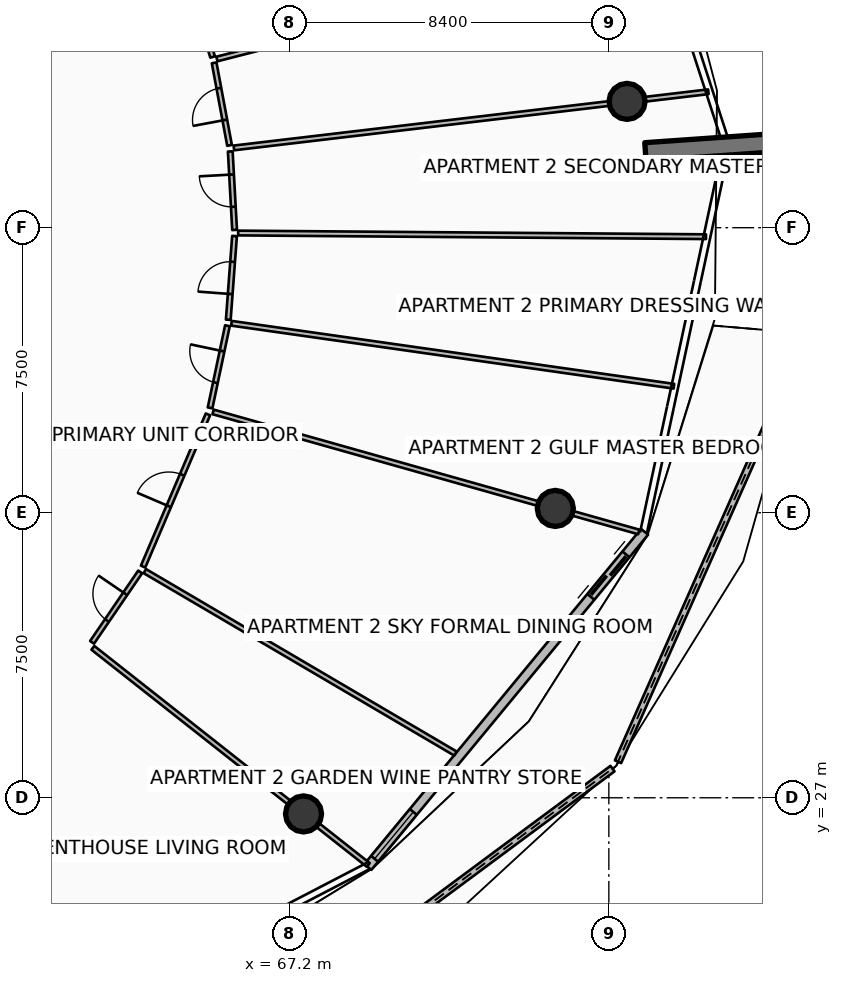
"""IFC4 building model, lengths in metres.
Left out: names, types, materials, properties, quantities, classifications, styles, units other than length and angle.
Written with IfcOpenShell. Run it as: python <this file> out.ifc"""

import sys

from ifc_helpers import new_model, si_unit, direction, frame, frame_2d, origin, origin_2d, place, context, subcontext, project, spatial, polyline, rectangle, circle, outline, extrude, element, fill, save


model = new_model("IFC4")
c1 = context("Model", 3, precision=1e-05, world=origin(), true_north=direction((0.0, 1.0)))
c2 = subcontext(c1, "Body", "Model", "MODEL_VIEW")
j1 = project(units=[si_unit("LENGTHUNIT", "METRE"), si_unit("PLANEANGLEUNIT", "RADIAN")], contexts=[c1])
p1 = place(None, origin())
s1 = spatial("IfcSite", under=j1, at=p1, CompositionType="ELEMENT")
p2 = place(p1, origin())
s2 = spatial("IfcBuilding", under=s1, at=p2, CompositionType="ELEMENT")
p3 = place(p2, frame((0.0, 0.0, 248.25)))
s3 = spatial("IfcBuildingStorey", under=s2, at=p3, CompositionType="ELEMENT", Elevation=248.25)
p4 = place(p3, frame((76.562, 43.997, 0.0), z_axis=(0.0, 0.0, 1.0), x_axis=(0.997563824095, 0.069759707979, 0.0)))
e1 = element("IfcWall", 1, at=p4, inside=s3, PredefinedType="SOLIDWALL", context=c2, shape_type="SweptSolid", body=[
    extrude(rectangle(XDim=3.5, YDim=0.48, at=frame_2d((1.75, 0.0))), origin(), (0.0, 0.0, 1.0), 3.85),
])
for number, where, z_axis, x_axis in (
    (2, (67.566, 26.575, 0.0), (0.0, 0.0, 1.0), (1.0, 0.0, 0.0)),
    (3, (74.191, 34.613, 0.0), (0.0, 0.0, 1.0), (1.0, 0.0, 0.0)),
    (4, (76.08, 45.323, 0.0), (0.0, 0.0, 1.0), (1.0, 0.0, 0.0)),
):
    element("IfcColumn", number, at=place(p3, frame(where, z_axis=z_axis, x_axis=x_axis)), inside=s3, PredefinedType="COLUMN", context=c2, shape_type="SweptSolid", body=[
        extrude(circle(Radius=0.475, at=origin_2d()), origin(), (0.0, 0.0, 1.0), 3.59),
    ])
p5 = place(p3, frame((66.319, 20.815, 0.0), z_axis=(0.0, 0.0, 1.0), x_axis=(0.803330402034, 0.59553359701, 0.0)))
e5 = element("IfcWall", 5, at=p5, inside=s3, PredefinedType="PARAPET", context=c2, shape_type="SweptSolid", body=[
    extrude(outline(polyline([(0.0, 0.0), (11.674, 0.0), (11.674, 1.832), (5.837, 1.696), (0.0, 1.497), (0.0, 0.0)])), frame((0.0, 0.09, 0.0), z_axis=(0.0, -1.0, 0.0), x_axis=(1.0, 0.0, 0.0)), (0.0, 0.0, 1.0), 0.18),
])
p6 = place(p3, frame((75.842, 27.948, 0.0), z_axis=(0.0, 0.0, 1.0), x_axis=(0.405327660322, 0.914171476135, 0.0)))
e6 = element("IfcWall", 6, at=p6, inside=s3, PredefinedType="PARAPET", context=c2, shape_type="SweptSolid", body=[
    extrude(outline(polyline([(0.0, 0.0), (12.323, 0.0), (12.323, 1.756), (6.162, 1.853), (0.0, 1.832), (0.0, 0.0)])), frame((0.0, 0.09, 0.0), z_axis=(0.0, -1.0, 0.0), x_axis=(1.0, 0.0, 0.0)), (0.0, 0.0, 1.0), 0.18),
])
p7 = place(p3, frame((69.258, 25.178, 0.0), z_axis=(0.0, 0.0, 1.0), x_axis=(0.636680093065, 0.771128043255, 0.0)))
e7 = element("IfcWall", 7, at=p7, inside=s3, PredefinedType="SOLIDWALL", context=c2, shape_type="SweptSolid", body=[
    extrude(rectangle(XDim=11.438, YDim=0.24, at=frame_2d((5.719, 0.0))), origin(), (0.0, 0.0, 1.0), 2.54),
])
p8 = place(p7, frame((9.218, 0.0, 0.0)))
e8 = element("IfcOpeningElement", 8, at=p8, cuts=e7, PredefinedType="OPENING", context=c2, shape_type="SweptSolid", body=[
    extrude(rectangle(XDim=1.45, YDim=2.15, at=frame_2d((0.725, 1.075))), frame((0.0, 0.13, 0.0), z_axis=(0.0, -1.0, 0.0), x_axis=(1.0, 0.0, 0.0)), (0.0, 0.0, 1.0), 0.26),
])
p9 = place(p7, frame((0.28, 0.0, 0.65)))
e9 = element("IfcOpeningElement", 9, at=p9, cuts=e7, PredefinedType="OPENING", context=c2, shape_type="SweptSolid", body=[
    extrude(rectangle(XDim=1.6, YDim=1.5, at=frame_2d((0.8, 0.75))), frame((0.0, 0.13, 0.0), z_axis=(0.0, -1.0, 0.0), x_axis=(1.0, 0.0, 0.0)), (0.0, 0.0, 1.0), 0.26),
])
p10 = place(p3, frame((62.023, 30.945, 0.0), z_axis=(0.0, 0.0, 1.0), x_axis=(0.785322102606, -0.619087388952, 0.0)))
e10 = element("IfcWall", 10, at=p10, inside=s3, PredefinedType="PARTITIONING", context=c2, shape_type="SweptSolid", body=[
    extrude(rectangle(XDim=9.228, YDim=0.125, at=frame_2d((4.614, 0.0))), origin(), (0.0, 0.0, 1.0), 2.957),
])
p11 = place(p3, frame((63.39, 32.963, 0.0), z_axis=(0.0, 0.0, 1.0), x_axis=(0.862331921897, -0.506343417532, 0.0)))
e11 = element("IfcWall", 11, at=p11, inside=s3, PredefinedType="PARTITIONING", context=c2, shape_type="SweptSolid", body=[
    extrude(rectangle(XDim=9.478, YDim=0.125, at=frame_2d((4.739, 0.0))), origin(), (0.0, 0.0, 1.0), 3.03),
])
p12 = place(p3, frame((62.001, 31.089, 0.0), z_axis=(0.0, 0.0, 1.0), x_axis=(0.564052095913, 0.825739204044, 0.0)))
e12 = element("IfcWall", 12, at=p12, inside=s3, PredefinedType="PARTITIONING", context=c2, shape_type="SweptSolid", body=[
    extrude(rectangle(XDim=2.245, YDim=0.125, at=frame_2d((1.122, 0.0))), origin(), (0.0, 0.0, 1.0), 2.957),
])
p13 = place(p12, frame((0.698, 0.0, 0.0)))
e13 = element("IfcOpeningElement", 13, at=p13, cuts=e12, PredefinedType="OPENING", context=c2, shape_type="SweptSolid", body=[
    extrude(rectangle(XDim=0.85, YDim=2.06, at=frame_2d((0.425, 1.03))), frame((0.0, 0.073, 0.0), z_axis=(0.0, -1.0, 0.0), x_axis=(1.0, 0.0, 0.0)), (0.0, 0.0, 1.0), 0.145),
])
p14 = place(p3, frame((63.344, 33.083, 0.0), z_axis=(0.0, 0.0, 1.0), x_axis=(0.392064212371, 0.919937852998, 0.0)))
e14 = element("IfcWall", 14, at=p14, inside=s3, PredefinedType="PARTITIONING", context=c2, shape_type="SweptSolid", body=[
    extrude(rectangle(XDim=4.354, YDim=0.125, at=frame_2d((2.177, 0.0))), origin(), (0.0, 0.0, 1.0), 2.957),
])
p15 = place(p14, frame((1.727, 0.0, 0.0)))
e15 = element("IfcOpeningElement", 15, at=p15, cuts=e14, PredefinedType="OPENING", context=c2, shape_type="SweptSolid", body=[
    extrude(rectangle(XDim=0.9, YDim=2.08, at=frame_2d((0.45, 1.04))), frame((0.0, 0.073, 0.0), z_axis=(0.0, -1.0, 0.0), x_axis=(1.0, 0.0, 0.0)), (0.0, 0.0, 1.0), 0.145),
])
p16 = place(p3, frame((65.187, 37.153, 0.0), z_axis=(0.0, 0.0, 1.0), x_axis=(0.962455577867, -0.271439239301, 0.0)))
e16 = element("IfcWall", 16, at=p16, inside=s3, PredefinedType="PARTITIONING", context=c2, shape_type="SweptSolid", body=[
    extrude(rectangle(XDim=11.639, YDim=0.125, at=frame_2d((5.819, 0.0))), origin(), (0.0, 0.0, 1.0), 2.957),
])
p17 = place(p3, frame((65.669, 39.485, 0.0), z_axis=(0.0, 0.0, 1.0), x_axis=(0.990022432034, -0.140909843761, 0.0)))
e17 = element("IfcWall", 17, at=p17, inside=s3, PredefinedType="PARTITIONING", context=c2, shape_type="SweptSolid", body=[
    extrude(rectangle(XDim=11.761, YDim=0.125, at=frame_2d((5.88, 0.0))), origin(), (0.0, 0.0, 1.0), 3.03),
])
p18 = place(p3, frame((65.846, 41.86, 0.0), z_axis=(0.0, 0.0, 1.0), x_axis=(0.999969162233, -0.007853316706, 0.0)))
e18 = element("IfcWall", 18, at=p18, inside=s3, PredefinedType="PARTITIONING", context=c2, shape_type="SweptSolid", body=[
    extrude(rectangle(XDim=12.311, YDim=0.125, at=frame_2d((6.155, 0.0))), origin(), (0.0, 0.0, 1.0), 3.03),
])
p19 = place(p3, frame((65.107, 37.258, 0.0), z_axis=(0.0, 0.0, 1.0), x_axis=(0.20677346991, 0.978388845062, 0.0)))
e19 = element("IfcWall", 19, at=p19, inside=s3, PredefinedType="PARTITIONING", context=c2, shape_type="SweptSolid", body=[
    extrude(rectangle(XDim=2.209, YDim=0.125, at=frame_2d((1.104, 0.0))), origin(), (0.0, 0.0, 1.0), 2.957),
])
p20 = place(p19, frame((0.68, 0.0, 0.0)))
e20 = element("IfcOpeningElement", 20, at=p20, cuts=e19, PredefinedType="OPENING", context=c2, shape_type="SweptSolid", body=[
    extrude(rectangle(XDim=0.85, YDim=2.06, at=frame_2d((0.425, 1.03))), frame((0.0, 0.073, 0.0), z_axis=(0.0, -1.0, 0.0), x_axis=(1.0, 0.0, 0.0)), (0.0, 0.0, 1.0), 0.145),
])
p21 = place(p3, frame((65.586, 39.578, 0.0), z_axis=(0.0, 0.0, 1.0), x_axis=(0.074490462528, 0.997221726093, 0.0)))
e21 = element("IfcWall", 21, at=p21, inside=s3, PredefinedType="PARTITIONING", context=c2, shape_type="SweptSolid", body=[
    extrude(rectangle(XDim=2.209, YDim=0.125, at=frame_2d((1.104, 0.0))), origin(), (0.0, 0.0, 1.0), 3.03),
])
p22 = place(p21, frame((0.679, 0.0, 0.0)))
e22 = element("IfcOpeningElement", 22, at=p22, cuts=e21, PredefinedType="OPENING", context=c2, shape_type="SweptSolid", body=[
    extrude(rectangle(XDim=0.85, YDim=2.06, at=frame_2d((0.425, 1.03))), frame((0.0, 0.073, 0.0), z_axis=(0.0, -1.0, 0.0), x_axis=(1.0, 0.0, 0.0)), (0.0, 0.0, 1.0), 0.145),
])
p23 = place(p3, frame((65.752, 41.94, 0.0), z_axis=(0.0, 0.0, 1.0), x_axis=(-0.055084577693, 0.998481692021, 0.0)))
e23 = element("IfcWall", 23, at=p23, inside=s3, PredefinedType="PARTITIONING", context=c2, shape_type="SweptSolid", body=[
    extrude(rectangle(XDim=2.07, YDim=0.125, at=frame_2d((1.035, 0.0))), origin(), (0.0, 0.0, 1.0), 2.957),
])
p24 = place(p23, frame((0.61, 0.0, 0.0)))
e24 = element("IfcOpeningElement", 24, at=p24, cuts=e23, PredefinedType="OPENING", context=c2, shape_type="SweptSolid", body=[
    extrude(rectangle(XDim=0.85, YDim=2.06, at=frame_2d((0.425, 1.03))), frame((0.0, 0.073, 0.0), z_axis=(0.0, -1.0, 0.0), x_axis=(1.0, 0.0, 0.0)), (0.0, 0.0, 1.0), 0.145),
])
p25 = place(p3, frame((65.733, 44.099, 0.0), z_axis=(0.0, 0.0, 1.0), x_axis=(0.99306831242, 0.117538618625, 0.0)))
e25 = element("IfcWall", 25, at=p25, inside=s3, PredefinedType="PARTITIONING", context=c2, shape_type="SweptSolid", body=[
    extrude(rectangle(XDim=12.573, YDim=0.125, at=frame_2d((6.286, 0.0))), origin(), (0.0, 0.0, 1.0), 2.957),
])
p26 = place(p3, frame((65.286, 46.438, 0.0), z_axis=(0.0, 0.0, 1.0), x_axis=(0.968583991447, 0.248686653265, 0.0)))
e26 = element("IfcWall", 26, at=p26, inside=s3, PredefinedType="PARTITIONING", context=c2, shape_type="SweptSolid", body=[
    extrude(rectangle(XDim=12.056, YDim=0.125, at=frame_2d((6.028, 0.0))), origin(), (0.0, 0.0, 1.0), 3.03),
])
p27 = place(p3, frame((65.619, 44.166, 0.0), z_axis=(0.0, 0.0, 1.0), x_axis=(-0.183454395516, 0.983028221755, 0.0)))
e27 = element("IfcWall", 27, at=p27, inside=s3, PredefinedType="PARTITIONING", context=c2, shape_type="SweptSolid", body=[
    extrude(rectangle(XDim=2.209, YDim=0.125, at=frame_2d((1.104, 0.0))), origin(), (0.0, 0.0, 1.0), 2.957),
])
p28 = place(p27, frame((0.68, 0.0, 0.0)))
e28 = element("IfcOpeningElement", 28, at=p28, cuts=e27, PredefinedType="OPENING", context=c2, shape_type="SweptSolid", body=[
    extrude(rectangle(XDim=0.85, YDim=2.06, at=frame_2d((0.425, 1.03))), frame((0.0, 0.073, 0.0), z_axis=(0.0, -1.0, 0.0), x_axis=(1.0, 0.0, 0.0)), (0.0, 0.0, 1.0), 0.145),
])
p29 = place(p3, frame((65.175, 46.492, 0.0), z_axis=(0.0, 0.0, 1.0), x_axis=(-0.305358332679, 0.952237516938, 0.0)))
e29 = element("IfcWall", 29, at=p29, inside=s3, PredefinedType="PARTITIONING", context=c2, shape_type="SweptSolid", body=[
    extrude(rectangle(XDim=1.931, YDim=0.125, at=frame_2d((0.965, 0.0))), origin(), (0.0, 0.0, 1.0), 3.03),
])
p30 = place(p29, frame((0.54, 0.0, 0.0)))
e30 = element("IfcOpeningElement", 30, at=p30, cuts=e29, PredefinedType="OPENING", context=c2, shape_type="SweptSolid", body=[
    extrude(rectangle(XDim=0.85, YDim=2.06, at=frame_2d((0.425, 1.03))), frame((0.0, 0.073, 0.0), z_axis=(0.0, -1.0, 0.0), x_axis=(1.0, 0.0, 0.0)), (0.0, 0.0, 1.0), 0.145),
])
p31 = place(p8, origin())
e31 = element("IfcDoor", 31, at=p31, inside=s3, OperationType="DOUBLE_DOOR_SLIDING", PredefinedType="DOOR", context=c2, shape_type="SweptSolid", body=[
    extrude(rectangle(XDim=1.45, YDim=2.15, at=frame_2d((0.725, 1.075))), frame((0.0, 0.025, 0.0), z_axis=(0.0, -1.0, 0.0), x_axis=(1.0, 0.0, 0.0)), (0.0, 0.0, 1.0), 0.05),
])
fill(e8, e31)
p32 = place(p9, origin())
e32 = element("IfcWindow", 32, at=p32, inside=s3, PartitioningType="SINGLE_PANEL", PredefinedType="WINDOW", context=c2, shape_type="SweptSolid", body=[
    extrude(rectangle(XDim=1.6, YDim=1.5, at=frame_2d((0.8, 0.75))), frame((0.0, 0.03, 0.0), z_axis=(0.0, -1.0, 0.0), x_axis=(1.0, 0.0, 0.0)), (0.0, 0.0, 1.0), 0.06),
])
fill(e9, e32)
p33 = place(p13, origin())
e33 = element("IfcDoor", 33, at=p33, inside=s3, OperationType="SINGLE_SWING_RIGHT", PredefinedType="DOOR", context=c2, shape_type="SweptSolid", body=[
    extrude(rectangle(XDim=0.85, YDim=2.06, at=frame_2d((0.425, 1.03))), frame((0.0, 0.025, 0.0), z_axis=(0.0, -1.0, 0.0), x_axis=(1.0, 0.0, 0.0)), (0.0, 0.0, 1.0), 0.05),
])
fill(e13, e33)
p34 = place(p15, origin())
e34 = element("IfcDoor", 34, at=p34, inside=s3, OperationType="SINGLE_SWING_LEFT", PredefinedType="DOOR", context=c2, shape_type="SweptSolid", body=[
    extrude(rectangle(XDim=0.9, YDim=2.08, at=frame_2d((0.45, 1.04))), frame((0.0, 0.025, 0.0), z_axis=(0.0, -1.0, 0.0), x_axis=(1.0, 0.0, 0.0)), (0.0, 0.0, 1.0), 0.05),
])
fill(e15, e34)
p35 = place(p20, origin())
e35 = element("IfcDoor", 35, at=p35, inside=s3, OperationType="SINGLE_SWING_RIGHT", PredefinedType="DOOR", context=c2, shape_type="SweptSolid", body=[
    extrude(rectangle(XDim=0.85, YDim=2.06, at=frame_2d((0.425, 1.03))), frame((0.0, 0.025, 0.0), z_axis=(0.0, -1.0, 0.0), x_axis=(1.0, 0.0, 0.0)), (0.0, 0.0, 1.0), 0.05),
])
fill(e20, e35)
p36 = place(p22, origin())
e36 = element("IfcDoor", 36, at=p36, inside=s3, OperationType="SINGLE_SWING_LEFT", PredefinedType="DOOR", context=c2, shape_type="SweptSolid", body=[
    extrude(rectangle(XDim=0.85, YDim=2.06, at=frame_2d((0.425, 1.03))), frame((0.0, 0.025, 0.0), z_axis=(0.0, -1.0, 0.0), x_axis=(1.0, 0.0, 0.0)), (0.0, 0.0, 1.0), 0.05),
])
fill(e22, e36)
p37 = place(p24, origin())
e37 = element("IfcDoor", 37, at=p37, inside=s3, OperationType="SINGLE_SWING_RIGHT", PredefinedType="DOOR", context=c2, shape_type="SweptSolid", body=[
    extrude(rectangle(XDim=0.85, YDim=2.06, at=frame_2d((0.425, 1.03))), frame((0.0, 0.025, 0.0), z_axis=(0.0, -1.0, 0.0), x_axis=(1.0, 0.0, 0.0)), (0.0, 0.0, 1.0), 0.05),
])
fill(e24, e37)
p38 = place(p28, origin())
e38 = element("IfcDoor", 38, at=p38, inside=s3, OperationType="SINGLE_SWING_LEFT", PredefinedType="DOOR", context=c2, shape_type="SweptSolid", body=[
    extrude(rectangle(XDim=0.85, YDim=2.06, at=frame_2d((0.425, 1.03))), frame((0.0, 0.025, 0.0), z_axis=(0.0, -1.0, 0.0), x_axis=(1.0, 0.0, 0.0)), (0.0, 0.0, 1.0), 0.05),
])
fill(e28, e38)
save(model, sys.argv[1])
